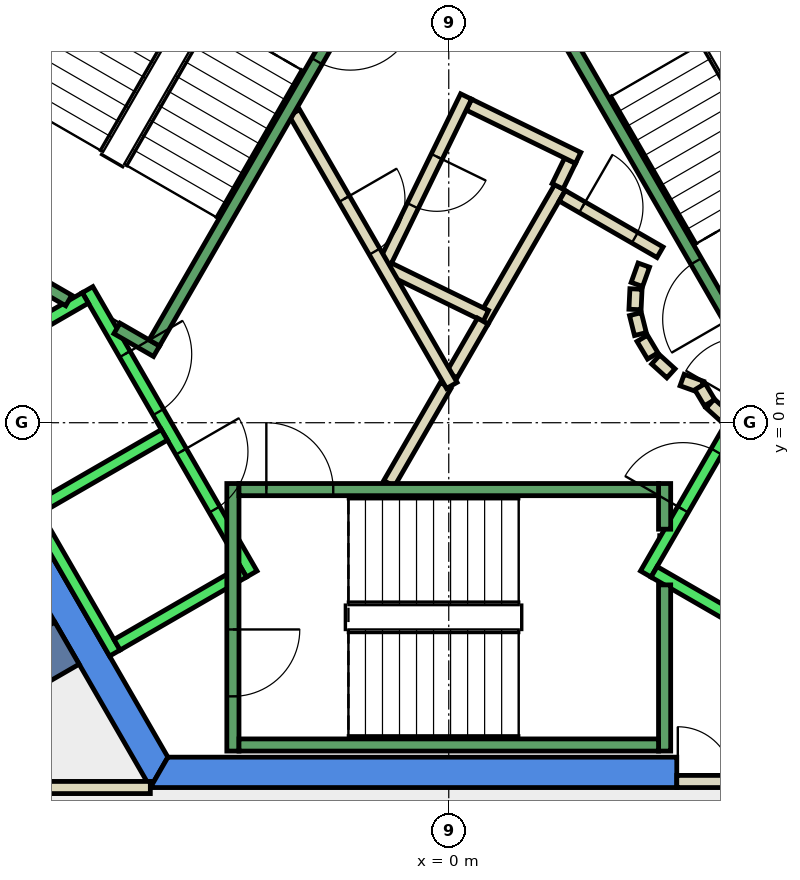
"""IFC4 building model, lengths in metres.
Left out: names, types, materials, properties, quantities, classifications, styles, units other than length and angle.
Written with IfcOpenShell. Run it as: python <this file> out.ifc"""

import sys

from ifc_helpers import new_model, si_unit, direction, frame, frame_2d, origin, place, context, subcontext, project, spatial, polyline, rectangle, outline, extrude, element, fill, save


model = new_model("IFC4")
c1 = context("Model", 3, precision=1e-05, world=origin(), true_north=direction((0.0, 1.0)))
c2 = subcontext(c1, "Body", "Model", "MODEL_VIEW")
j1 = project(units=[si_unit("LENGTHUNIT", "METRE"), si_unit("PLANEANGLEUNIT", "RADIAN")], contexts=[c1])
p1 = place(None, origin())
s1 = spatial("IfcSite", under=j1, at=p1, CompositionType="ELEMENT")
p2 = place(p1, origin())
s2 = spatial("IfcBuilding", under=s1, at=p2, CompositionType="ELEMENT")
p3 = place(p2, frame((0.0, 0.0, 308.0)))
s3 = spatial("IfcBuildingStorey", under=s2, at=p3, CompositionType="ELEMENT", Elevation=308.0)
p4 = place(p3, frame((0.0, 0.0, -0.34)))
e1 = element("IfcWall", 1, at=p4, inside=s3, PredefinedType="SHEAR", context=c2, shape_type="SweptSolid", body=[
    extrude(outline(polyline([(-9.236, 3.502), (-8.803, 3.253), (-4.619, 10.5), (-4.907, 11.0), (-9.236, 3.502)])), origin(), (0.0, 0.0, 1.0), 3.6),
])
p5 = place(p3, frame((0.0, 0.0, -0.34)))
e2 = element("IfcWall", 2, at=p5, inside=s3, PredefinedType="SHEAR", context=c2, shape_type="SweptSolid", body=[
    extrude(outline(polyline([(-9.815, 2.5), (-4.907, -6.0), (-4.619, -5.5), (-9.238, 2.5), (-9.815, 2.5)])), origin(), (0.0, 0.0, 1.0), 3.6),
])
p6 = place(p3, frame((0.0, 0.0, -0.34)))
e3 = element("IfcWall", 3, at=p6, inside=s3, PredefinedType="SHEAR", context=c2, shape_type="SweptSolid", body=[
    extrude(outline(polyline([(3.75, -6.0), (3.75, -5.5), (-4.619, -5.5), (-4.907, -6.0), (3.75, -6.0)])), origin(), (0.0, 0.0, 1.0), 3.6),
])
p7 = place(p3, frame((-6.279, -3.625, -0.34), z_axis=(0.0, 0.0, 1.0), x_axis=(-0.866017533419, -0.500013631625, 0.0)))
e4 = element("IfcWall", 4, at=p7, inside=s3, PredefinedType="SHEAR", context=c2, shape_type="SweptSolid", body=[
    extrude(rectangle(XDim=9.0, YDim=0.8, at=frame_2d((4.5, 0.0))), origin(), (0.0, 0.0, 1.0), 3.6),
])
p8 = place(p3, frame((0.56, 1.671, 0.0), z_axis=(0.0, 0.0, 1.0), x_axis=(0.500008334558, 0.866020591771, 0.0)))
e5 = element("IfcWall", 5, at=p8, inside=s3, PredefinedType="PARTITIONING", context=c2, shape_type="SweptSolid", body=[
    extrude(rectangle(XDim=2.538, YDim=0.2, at=frame_2d((1.269, 0.0))), origin(), (0.0, 0.0, 1.0), 3.26),
])
p9 = place(p3, frame((1.79, 3.888, 0.0), z_axis=(0.0, 0.0, 1.0), x_axis=(0.437807406823, 0.899068781869, 0.0)))
e6 = element("IfcWall", 6, at=p9, inside=s3, PredefinedType="PARTITIONING", context=c2, shape_type="SweptSolid", body=[
    extrude(rectangle(XDim=0.469, YDim=0.2, at=frame_2d((0.234, 0.0))), origin(), (0.0, 0.0, 1.0), 3.26),
])
p10 = place(p3, frame((2.128, 4.355, 0.0), z_axis=(0.0, 0.0, 1.0), x_axis=(-0.898876404494, 0.438202247191, 0.0)))
e7 = element("IfcWall", 7, at=p10, inside=s3, PredefinedType="PARTITIONING", context=c2, shape_type="SweptSolid", body=[
    extrude(rectangle(XDim=1.999, YDim=0.2, at=frame_2d((1.0, 0.0))), origin(), (0.0, 0.0, 1.0), 3.26),
])
p11 = place(p3, frame((0.285, 5.365, 0.0), z_axis=(0.0, 0.0, 1.0), x_axis=(-0.43840190643, -0.898779043168, 0.0)))
e8 = element("IfcWall", 8, at=p11, inside=s3, PredefinedType="PARTITIONING", context=c2, shape_type="SweptSolid", body=[
    extrude(rectangle(XDim=3.1, YDim=0.2, at=frame_2d((1.55, 0.0))), origin(), (0.0, 0.0, 1.0), 3.26),
])
p12 = place(p11, frame((1.1, 0.0, 0.0)))
e9 = element("IfcOpeningElement", 9, at=p12, cuts=e8, PredefinedType="OPENING", context=c2, shape_type="SweptSolid", body=[
    extrude(rectangle(XDim=0.9, YDim=2.1, at=frame_2d((0.45, 1.05))), frame((0.0, 0.11, 0.0), z_axis=(0.0, -1.0, 0.0), x_axis=(1.0, 0.0, 0.0)), (0.0, 0.0, 1.0), 0.22),
])
p13 = place(p3, frame((-0.984, 2.535, 0.0), z_axis=(0.0, 0.0, 1.0), x_axis=(0.898707583217, -0.438548378025, 0.0)))
e10 = element("IfcWall", 10, at=p13, inside=s3, PredefinedType="PARTITIONING", context=c2, shape_type="SweptSolid", body=[
    extrude(rectangle(XDim=1.774, YDim=0.2, at=frame_2d((0.887, 0.0))), origin(), (0.0, 0.0, 1.0), 3.26),
])
p14 = place(p3, frame((-0.982, -1.0, 0.0), z_axis=(0.0, 0.0, 1.0), x_axis=(0.50024047865, 0.865886518847, 0.0)))
e11 = element("IfcWall", 11, at=p14, inside=s3, PredefinedType="PARTITIONING", context=c2, shape_type="SweptSolid", body=[
    extrude(rectangle(XDim=1.863, YDim=0.2, at=frame_2d((0.931, 0.0))), origin(), (0.0, 0.0, 1.0), 3.26),
])
p15 = place(p3, frame((0.05, 0.787, 0.0), z_axis=(0.0, 0.0, 1.0), x_axis=(0.499819111317, 0.866129814729, 0.0)))
e12 = element("IfcWall", 12, at=p15, inside=s3, PredefinedType="PARTITIONING", context=c2, shape_type="SweptSolid", body=[
    extrude(rectangle(XDim=1.021, YDim=0.2, at=frame_2d((0.51, 0.0))), origin(), (0.0, 0.0, 1.0), 3.26),
])
p16 = place(p3, frame((1.866, 3.732, 0.0), z_axis=(0.0, 0.0, 1.0), x_axis=(0.866043361281, -0.499968895414, 0.0)))
e13 = element("IfcWall", 13, at=p16, inside=s3, PredefinedType="PARTITIONING", context=c2, shape_type="SweptSolid", body=[
    extrude(rectangle(XDim=1.858, YDim=0.2, at=frame_2d((0.929, 0.0))), origin(), (0.0, 0.0, 1.0), 3.26),
])
p17 = place(p16, frame((0.379, 0.0, 0.0)))
e14 = element("IfcOpeningElement", 14, at=p17, cuts=e13, PredefinedType="OPENING", context=c2, shape_type="SweptSolid", body=[
    extrude(rectangle(XDim=1.0, YDim=2.1, at=frame_2d((0.5, 1.05))), frame((0.0, 0.11, 0.0), z_axis=(0.0, -1.0, 0.0), x_axis=(1.0, 0.0, 0.0)), (0.0, 0.0, 1.0), 0.22),
])
p18 = place(p3, frame((3.208, 2.592, 0.0), z_axis=(0.0, 0.0, 1.0), x_axis=(-0.337388820924, -0.941365382578, 0.0)))
e15 = element("IfcWall", 15, at=p18, inside=s3, PredefinedType="PARTITIONING", context=c2, shape_type="SweptSolid", body=[
    extrude(rectangle(XDim=0.338, YDim=0.2, at=frame_2d((0.169, 0.0))), origin(), (0.0, 0.0, 1.0), 3.26),
])
p19 = place(p3, frame((3.079, 2.199, 0.0), z_axis=(0.0, 0.0, 1.0), x_axis=(-0.047771483479, -0.998858290933, 0.0)))
e16 = element("IfcWall", 16, at=p19, inside=s3, PredefinedType="PARTITIONING", context=c2, shape_type="SweptSolid", body=[
    extrude(rectangle(XDim=0.337, YDim=0.2, at=frame_2d((0.169, 0.0))), origin(), (0.0, 0.0, 1.0), 3.26),
])
p20 = place(p3, frame((3.07, 1.786, 0.0), z_axis=(0.0, 0.0, 1.0), x_axis=(0.242705583207, -0.970099994784, 0.0)))
e17 = element("IfcWall", 17, at=p20, inside=s3, PredefinedType="PARTITIONING", context=c2, shape_type="SweptSolid", body=[
    extrude(rectangle(XDim=0.338, YDim=0.2, at=frame_2d((0.169, 0.0))), origin(), (0.0, 0.0, 1.0), 3.26),
])
for number, where, z_axis, x_axis in (
    (18, (3.182, 1.388, 0.0), (0.0, 0.0, 1.0), (0.512, -0.859, 0.0)),
    (19, (3.404, 1.039, 0.0), (0.0, 0.0, 1.0), (0.74, -0.672, 0.0)),
):
    element("IfcWall", number, at=place(p3, frame(where, z_axis=z_axis, x_axis=x_axis)), inside=s3, PredefinedType="PARTITIONING", context=c2, shape_type="SweptSolid", body=[
        extrude(rectangle(XDim=0.338, YDim=0.2, at=frame_2d((0.169, 0.0))), origin(), (0.0, 0.0, 1.0), 3.26),
    ])
p21 = place(p3, frame((3.838, 0.702, 0.0), z_axis=(0.0, 0.0, 1.0), x_axis=(0.941035081519, -0.338308993895, 0.0)))
e20 = element("IfcWall", 20, at=p21, inside=s3, PredefinedType="PARTITIONING", context=c2, shape_type="SweptSolid", body=[
    extrude(rectangle(XDim=0.337, YDim=0.2, at=frame_2d((0.168, 0.0))), origin(), (0.0, 0.0, 1.0), 3.26),
])
p22 = place(p3, frame((4.132, 0.593, 0.0), z_axis=(0.0, 0.0, 1.0), x_axis=(0.513561617048, -0.858052717201, 0.0)))
e21 = element("IfcWall", 21, at=p22, inside=s3, PredefinedType="PARTITIONING", context=c2, shape_type="SweptSolid", body=[
    extrude(rectangle(XDim=0.308, YDim=0.2, at=frame_2d((0.154, 0.0))), origin(), (0.0, 0.0, 1.0), 3.26),
])
p23 = place(p3, frame((4.301, 0.315, 0.0), z_axis=(0.0, 0.0, 1.0), x_axis=(0.741798017506, -0.670623367639, 0.0)))
e22 = element("IfcWall", 22, at=p23, inside=s3, PredefinedType="PARTITIONING", context=c2, shape_type="SweptSolid", body=[
    extrude(rectangle(XDim=0.309, YDim=0.2, at=frame_2d((0.154, 0.0))), origin(), (0.0, 0.0, 1.0), 3.26),
])
p24 = place(p3, frame((-2.54, 5.1, 0.0), z_axis=(0.0, 0.0, 1.0), x_axis=(0.499925051871, -0.866068670783, 0.0)))
e23 = element("IfcWall", 23, at=p24, inside=s3, PredefinedType="PARTITIONING", context=c2, shape_type="SweptSolid", body=[
    extrude(rectangle(XDim=5.181, YDim=0.2, at=frame_2d((2.59, 0.0))), origin(), (0.0, 0.0, 1.0), 3.26),
])
p25 = place(p24, frame((1.64, 0.0, 0.0)))
e24 = element("IfcOpeningElement", 24, at=p25, cuts=e23, PredefinedType="OPENING", context=c2, shape_type="SweptSolid", body=[
    extrude(rectangle(XDim=1.0, YDim=2.1, at=frame_2d((0.5, 1.05))), frame((0.0, 0.11, 0.0), z_axis=(0.0, -1.0, 0.0), x_axis=(1.0, 0.0, 0.0)), (0.0, 0.0, 1.0), 0.22),
])
p26 = place(p3, frame((-7.7, -5.999, 0.0), z_axis=(0.0, 0.0, 1.0), x_axis=(1.0, 0.0, 0.0)))
e25 = element("IfcWall", 25, at=p26, inside=s3, PredefinedType="PARTITIONING", context=c2, shape_type="SweptSolid", body=[
    extrude(rectangle(XDim=2.792, YDim=0.2, at=frame_2d((1.396, 0.0))), origin(), (0.0, 0.0, 1.0), 3.26),
])
p27 = place(p3, frame((3.75, -5.9, 0.0), z_axis=(0.0, 0.0, 1.0), x_axis=(1.0, 0.0, 0.0)))
e26 = element("IfcWall", 26, at=p27, inside=s3, PredefinedType="PARTITIONING", context=c2, shape_type="SweptSolid", body=[
    extrude(rectangle(XDim=0.926, YDim=0.2, at=frame_2d((0.463, 0.0))), origin(), (0.0, 0.0, 1.0), 2.4),
])
p28 = place(p27, frame((0.017, 0.0, 0.0)))
e27 = element("IfcOpeningElement", 27, at=p28, cuts=e26, PredefinedType="OPENING", context=c2, shape_type="SweptSolid", body=[
    extrude(rectangle(XDim=0.9, YDim=2.1, at=frame_2d((0.45, 1.05))), frame((0.0, 0.11, 0.0), z_axis=(0.0, -1.0, 0.0), x_axis=(1.0, 0.0, 0.0)), (0.0, 0.0, 1.0), 0.22),
])
p29 = place(p3, frame((-5.94, 2.188, 0.0), z_axis=(0.0, 0.0, 1.0), x_axis=(0.500034260056, -0.866005622828, 0.0)))
e28 = element("IfcWall", 28, at=p29, inside=s3, PredefinedType="STANDARD", context=c2, shape_type="SweptSolid", body=[
    extrude(rectangle(XDim=5.399, YDim=0.2, at=frame_2d((2.7, 0.0))), origin(), (0.0, 0.0, 1.0), 3.26),
])
p30 = place(p29, frame((3.075, 0.0, 0.0)))
e29 = element("IfcOpeningElement", 29, at=p30, cuts=e28, PredefinedType="OPENING", context=c2, shape_type="SweptSolid", body=[
    extrude(rectangle(XDim=1.1, YDim=2.1, at=frame_2d((0.55, 1.05))), frame((0.0, 0.11, 0.0), z_axis=(0.0, -1.0, 0.0), x_axis=(1.0, 0.0, 0.0)), (0.0, 0.0, 1.0), 0.22),
])
p31 = place(p29, frame((1.225, 0.0, 0.0)))
e30 = element("IfcOpeningElement", 30, at=p31, cuts=e28, PredefinedType="OPENING", context=c2, shape_type="SweptSolid", body=[
    extrude(rectangle(XDim=1.1, YDim=2.1, at=frame_2d((0.55, 1.05))), frame((0.0, 0.11, 0.0), z_axis=(0.0, -1.0, 0.0), x_axis=(1.0, 0.0, 0.0)), (0.0, 0.0, 1.0), 0.22),
])
p32 = place(p3, frame((-8.192, 0.888, 0.0), z_axis=(0.0, 0.0, 1.0), x_axis=(0.500034260056, -0.866005622828, 0.0)))
e31 = element("IfcWall", 31, at=p32, inside=s3, PredefinedType="STANDARD", context=c2, shape_type="SweptSolid", body=[
    extrude(rectangle(XDim=5.399, YDim=0.2, at=frame_2d((2.7, 0.0))), origin(), (0.0, 0.0, 1.0), 3.26),
])
for number, where, z_axis, x_axis in (
    (32, (-5.977, 2.052, 0.0), (0.0, 0.0, 1.0), (-0.866, -0.5, 0.0)),
    (33, (-4.677, -0.2, 0.0), (0.0, 0.0, 1.0), (-0.866, -0.5, 0.0)),
):
    element("IfcWall", number, at=place(p3, frame(where, z_axis=z_axis, x_axis=x_axis)), inside=s3, PredefinedType="STANDARD", context=c2, shape_type="SweptSolid", body=[
        extrude(rectangle(XDim=2.399, YDim=0.2, at=frame_2d((1.2, 0.0))), origin(), (0.0, 0.0, 1.0), 3.26),
    ])
p33 = place(p3, frame((-3.377, -2.452, 0.0), z_axis=(0.0, 0.0, 1.0), x_axis=(-0.865955154139, -0.50012165622, 0.0)))
e34 = element("IfcWall", 34, at=p33, inside=s3, PredefinedType="STANDARD", context=c2, shape_type="SweptSolid", body=[
    extrude(rectangle(XDim=2.4, YDim=0.2, at=frame_2d((1.2, 0.0))), origin(), (0.0, 0.0, 1.0), 3.26),
])
p34 = place(p3, frame((3.24, -2.488, 0.0), z_axis=(0.0, 0.0, 1.0), x_axis=(0.500034260056, 0.866005622828, 0.0)))
e35 = element("IfcWall", 35, at=p34, inside=s3, PredefinedType="STANDARD", context=c2, shape_type="SweptSolid", body=[
    extrude(rectangle(XDim=5.399, YDim=0.2, at=frame_2d((2.7, 0.0))), origin(), (0.0, 0.0, 1.0), 3.26),
])
p35 = place(p34, frame((3.225, 0.0, 0.0)))
e36 = element("IfcOpeningElement", 36, at=p35, cuts=e35, PredefinedType="OPENING", context=c2, shape_type="SweptSolid", body=[
    extrude(rectangle(XDim=1.1, YDim=2.1, at=frame_2d((0.55, 1.05))), frame((0.0, 0.11, 0.0), z_axis=(0.0, -1.0, 0.0), x_axis=(1.0, 0.0, 0.0)), (0.0, 0.0, 1.0), 0.22),
])
p36 = place(p34, frame((1.225, 0.0, 0.0)))
e37 = element("IfcOpeningElement", 37, at=p36, cuts=e35, PredefinedType="OPENING", context=c2, shape_type="SweptSolid", body=[
    extrude(rectangle(XDim=1.1, YDim=2.1, at=frame_2d((0.55, 1.05))), frame((0.0, 0.11, 0.0), z_axis=(0.0, -1.0, 0.0), x_axis=(1.0, 0.0, 0.0)), (0.0, 0.0, 1.0), 0.22),
])
p37 = place(p3, frame((3.377, -2.452, 0.0), z_axis=(0.0, 0.0, 1.0), x_axis=(0.865955154139, -0.50012165622, 0.0)))
e38 = element("IfcWall", 38, at=p37, inside=s3, PredefinedType="STANDARD", context=c2, shape_type="SweptSolid", body=[
    extrude(rectangle(XDim=2.4, YDim=0.2, at=frame_2d((1.2, 0.0))), origin(), (0.0, 0.0, 1.0), 3.26),
])
p38 = place(p3, frame((-3.55, -1.0, 0.0), z_axis=(0.0, 0.0, 1.0), x_axis=(0.0, -1.0, 0.0)))
e39 = element("IfcWall", 39, at=p38, inside=s3, PredefinedType="STANDARD", context=c2, shape_type="SweptSolid", body=[
    extrude(rectangle(XDim=4.4, YDim=0.2, at=frame_2d((2.2, 0.0))), origin(), (0.0, 0.0, 1.0), 3.26),
])
p39 = place(p38, frame((2.4, 0.0, 0.0)))
e40 = element("IfcOpeningElement", 40, at=p39, cuts=e39, PredefinedType="OPENING", context=c2, shape_type="SweptSolid", body=[
    extrude(rectangle(XDim=1.1, YDim=2.2, at=frame_2d((0.55, 1.1))), frame((0.0, 0.11, 0.0), z_axis=(0.0, -1.0, 0.0), x_axis=(1.0, 0.0, 0.0)), (0.0, 0.0, 1.0), 0.22),
])
p40 = place(p3, frame((3.55, -2.667, 0.0), z_axis=(0.0, 0.0, 1.0), x_axis=(0.0, -1.0, 0.0)))
e41 = element("IfcWall", 41, at=p40, inside=s3, PredefinedType="STANDARD", context=c2, shape_type="SweptSolid", body=[
    extrude(rectangle(XDim=2.733, YDim=0.2, at=frame_2d((1.366, 0.0))), origin(), (0.0, 0.0, 1.0), 3.26),
])
p41 = place(p3, frame((3.55, -1.0, 0.0), z_axis=(0.0, 0.0, 1.0), x_axis=(0.0, -1.0, 0.0)))
e42 = element("IfcWall", 42, at=p41, inside=s3, PredefinedType="STANDARD", context=c2, shape_type="SweptSolid", body=[
    extrude(rectangle(XDim=0.751, YDim=0.2, at=frame_2d((0.375, 0.0))), origin(), (0.0, 0.0, 1.0), 3.26),
])
p42 = place(p3, frame((-3.45, -1.1, 0.0), z_axis=(0.0, 0.0, 1.0), x_axis=(1.0, 0.0, 0.0)))
e43 = element("IfcWall", 43, at=p42, inside=s3, PredefinedType="STANDARD", context=c2, shape_type="SweptSolid", body=[
    extrude(rectangle(XDim=6.9, YDim=0.2, at=frame_2d((3.45, 0.0))), origin(), (0.0, 0.0, 1.0), 3.26),
])
p43 = place(p42, frame((0.45, 0.0, 0.0)))
e44 = element("IfcOpeningElement", 44, at=p43, cuts=e43, PredefinedType="OPENING", context=c2, shape_type="SweptSolid", body=[
    extrude(rectangle(XDim=1.1, YDim=2.2, at=frame_2d((0.55, 1.1))), frame((0.0, 0.11, 0.0), z_axis=(0.0, -1.0, 0.0), x_axis=(1.0, 0.0, 0.0)), (0.0, 0.0, 1.0), 0.22),
])
p44 = place(p3, frame((-3.45, -5.3, 0.0), z_axis=(0.0, 0.0, 1.0), x_axis=(1.0, 0.0, 0.0)))
e45 = element("IfcWall", 45, at=p44, inside=s3, PredefinedType="STANDARD", context=c2, shape_type="SweptSolid", body=[
    extrude(rectangle(XDim=6.9, YDim=0.2, at=frame_2d((3.45, 0.0))), origin(), (0.0, 0.0, 1.0), 3.26),
])
p45 = place(p3, frame((4.843, 1.312, 0.0), z_axis=(0.0, 0.0, 1.0), x_axis=(-0.499963383562, 0.866046543262, 0.0)))
e46 = element("IfcWall", 46, at=p45, inside=s3, PredefinedType="STANDARD", context=c2, shape_type="SweptSolid", body=[
    extrude(rectangle(XDim=6.9, YDim=0.2, at=frame_2d((3.45, 0.0))), origin(), (0.0, 0.0, 1.0), 3.26),
])
p46 = place(p45, frame((0.45, 0.0, 0.0)))
e47 = element("IfcOpeningElement", 47, at=p46, cuts=e46, PredefinedType="OPENING", context=c2, shape_type="SweptSolid", body=[
    extrude(rectangle(XDim=1.1, YDim=2.2, at=frame_2d((0.55, 1.1))), frame((0.0, 0.11, 0.0), z_axis=(0.0, -1.0, 0.0), x_axis=(1.0, 0.0, 0.0)), (0.0, 0.0, 1.0), 0.22),
])
p47 = place(p3, frame((-6.25, 2.01, 0.0), z_axis=(0.0, 0.0, 1.0), x_axis=(-0.86611865017, 0.499838457731, 0.0)))
e48 = element("IfcWall", 48, at=p47, inside=s3, PredefinedType="STANDARD", context=c2, shape_type="SweptSolid", body=[
    extrude(rectangle(XDim=2.733, YDim=0.2, at=frame_2d((1.366, 0.0))), origin(), (0.0, 0.0, 1.0), 3.26),
])
p48 = place(p3, frame((-4.806, 1.176, 0.0), z_axis=(0.0, 0.0, 1.0), x_axis=(-0.866558586415, 0.499075361355, 0.0)))
e49 = element("IfcWall", 49, at=p48, inside=s3, PredefinedType="STANDARD", context=c2, shape_type="SweptSolid", body=[
    extrude(rectangle(XDim=0.751, YDim=0.2, at=frame_2d((0.376, 0.0))), origin(), (0.0, 0.0, 1.0), 3.26),
])
p49 = place(p3, frame((-1.393, 7.288, 0.0), z_axis=(0.0, 0.0, 1.0), x_axis=(-0.499963383562, -0.866046543262, 0.0)))
e50 = element("IfcWall", 50, at=p49, inside=s3, PredefinedType="STANDARD", context=c2, shape_type="SweptSolid", body=[
    extrude(rectangle(XDim=6.9, YDim=0.2, at=frame_2d((3.45, 0.0))), origin(), (0.0, 0.0, 1.0), 3.26),
])
p50 = place(p49, frame((0.45, 0.0, 0.0)))
e51 = element("IfcOpeningElement", 51, at=p50, cuts=e50, PredefinedType="OPENING", context=c2, shape_type="SweptSolid", body=[
    extrude(rectangle(XDim=1.1, YDim=2.2, at=frame_2d((0.55, 1.1))), frame((0.0, 0.11, 0.0), z_axis=(0.0, -1.0, 0.0), x_axis=(1.0, 0.0, 0.0)), (0.0, 0.0, 1.0), 0.22),
])
p51 = place(p3, frame((-5.03, 9.388, 0.0), z_axis=(0.0, 0.0, 1.0), x_axis=(-0.499978703459, -0.866037698999, 0.0)))
e52 = element("IfcWall", 52, at=p51, inside=s3, PredefinedType="STANDARD", context=c2, shape_type="SweptSolid", body=[
    extrude(rectangle(XDim=6.9, YDim=0.2, at=frame_2d((3.45, 0.0))), origin(), (0.0, 0.0, 1.0), 3.26),
])
p52 = place(p17, origin())
e53 = element("IfcDoor", 53, at=p52, inside=s3, OperationType="SINGLE_SWING_LEFT", PredefinedType="DOOR", context=c2, shape_type="SweptSolid", body=[
    extrude(rectangle(XDim=1.0, YDim=2.1, at=frame_2d((0.5, 1.05))), frame((0.0, 0.025, 0.0), z_axis=(0.0, -1.0, 0.0), x_axis=(1.0, 0.0, 0.0)), (0.0, 0.0, 1.0), 0.05),
])
fill(e14, e53)
p53 = place(p25, origin())
e54 = element("IfcDoor", 54, at=p53, inside=s3, OperationType="SINGLE_SWING_RIGHT", PredefinedType="DOOR", context=c2, shape_type="SweptSolid", body=[
    extrude(rectangle(XDim=1.0, YDim=2.1, at=frame_2d((0.5, 1.05))), frame((0.0, 0.025, 0.0), z_axis=(0.0, -1.0, 0.0), x_axis=(1.0, 0.0, 0.0)), (0.0, 0.0, 1.0), 0.05),
])
fill(e24, e54)
p54 = place(p12, origin())
e55 = element("IfcDoor", 55, at=p54, inside=s3, OperationType="SINGLE_SWING_RIGHT", PredefinedType="DOOR", context=c2, shape_type="SweptSolid", body=[
    extrude(rectangle(XDim=0.9, YDim=2.1, at=frame_2d((0.45, 1.05))), frame((0.0, 0.025, 0.0), z_axis=(0.0, -1.0, 0.0), x_axis=(1.0, 0.0, 0.0)), (0.0, 0.0, 1.0), 0.05),
])
fill(e9, e55)
p55 = place(p28, origin())
e56 = element("IfcDoor", 56, at=p55, inside=s3, OperationType="SINGLE_SWING_LEFT", PredefinedType="DOOR", context=c2, shape_type="SweptSolid", body=[
    extrude(rectangle(XDim=0.9, YDim=2.1, at=frame_2d((0.45, 1.05))), frame((0.0, 0.025, 0.0), z_axis=(0.0, -1.0, 0.0), x_axis=(1.0, 0.0, 0.0)), (0.0, 0.0, 1.0), 0.05),
])
fill(e27, e56)
p56 = place(p30, origin())
e57 = element("IfcDoor", 57, at=p56, inside=s3, OperationType="SLIDING_TO_LEFT", PredefinedType="DOOR", context=c2, shape_type="SweptSolid", body=[
    extrude(rectangle(XDim=1.1, YDim=2.1, at=frame_2d((0.55, 1.05))), frame((0.0, 0.025, 0.0), z_axis=(0.0, -1.0, 0.0), x_axis=(1.0, 0.0, 0.0)), (0.0, 0.0, 1.0), 0.05),
])
fill(e29, e57)
p57 = place(p36, origin())
e58 = element("IfcDoor", 58, at=p57, inside=s3, OperationType="SLIDING_TO_LEFT", PredefinedType="DOOR", context=c2, shape_type="SweptSolid", body=[
    extrude(rectangle(XDim=1.1, YDim=2.1, at=frame_2d((0.55, 1.05))), frame((0.0, 0.025, 0.0), z_axis=(0.0, -1.0, 0.0), x_axis=(1.0, 0.0, 0.0)), (0.0, 0.0, 1.0), 0.05),
])
fill(e37, e58)
p58 = place(p31, origin())
e59 = element("IfcDoor", 59, at=p58, inside=s3, OperationType="SLIDING_TO_LEFT", PredefinedType="DOOR", context=c2, shape_type="SweptSolid", body=[
    extrude(rectangle(XDim=1.1, YDim=2.1, at=frame_2d((0.55, 1.05))), frame((0.0, 0.025, 0.0), z_axis=(0.0, -1.0, 0.0), x_axis=(1.0, 0.0, 0.0)), (0.0, 0.0, 1.0), 0.05),
])
fill(e30, e59)
p59 = place(p43, origin())
e60 = element("IfcDoor", 60, at=p59, inside=s3, OperationType="SINGLE_SWING_LEFT", PredefinedType="DOOR", context=c2, shape_type="SweptSolid", body=[
    extrude(rectangle(XDim=1.1, YDim=2.2, at=frame_2d((0.55, 1.1))), frame((0.0, 0.025, 0.0), z_axis=(0.0, -1.0, 0.0), x_axis=(1.0, 0.0, 0.0)), (0.0, 0.0, 1.0), 0.05),
])
fill(e44, e60)
p60 = place(p39, origin())
e61 = element("IfcDoor", 61, at=p60, inside=s3, OperationType="SINGLE_SWING_LEFT", PredefinedType="DOOR", context=c2, shape_type="SweptSolid", body=[
    extrude(rectangle(XDim=1.1, YDim=2.2, at=frame_2d((0.55, 1.1))), frame((0.0, 0.025, 0.0), z_axis=(0.0, -1.0, 0.0), x_axis=(1.0, 0.0, 0.0)), (0.0, 0.0, 1.0), 0.05),
])
fill(e40, e61)
p61 = place(p46, origin())
e62 = element("IfcDoor", 62, at=p61, inside=s3, OperationType="SINGLE_SWING_LEFT", PredefinedType="DOOR", context=c2, shape_type="SweptSolid", body=[
    extrude(rectangle(XDim=1.1, YDim=2.2, at=frame_2d((0.55, 1.1))), frame((0.0, 0.025, 0.0), z_axis=(0.0, -1.0, 0.0), x_axis=(1.0, 0.0, 0.0)), (0.0, 0.0, 1.0), 0.05),
])
fill(e47, e62)
p62 = place(p50, origin())
e63 = element("IfcDoor", 63, at=p62, inside=s3, OperationType="SINGLE_SWING_LEFT", PredefinedType="DOOR", context=c2, shape_type="SweptSolid", body=[
    extrude(rectangle(XDim=1.1, YDim=2.2, at=frame_2d((0.55, 1.1))), frame((0.0, 0.025, 0.0), z_axis=(0.0, -1.0, 0.0), x_axis=(1.0, 0.0, 0.0)), (0.0, 0.0, 1.0), 0.05),
])
fill(e51, e63)
save(model, sys.argv[1])
